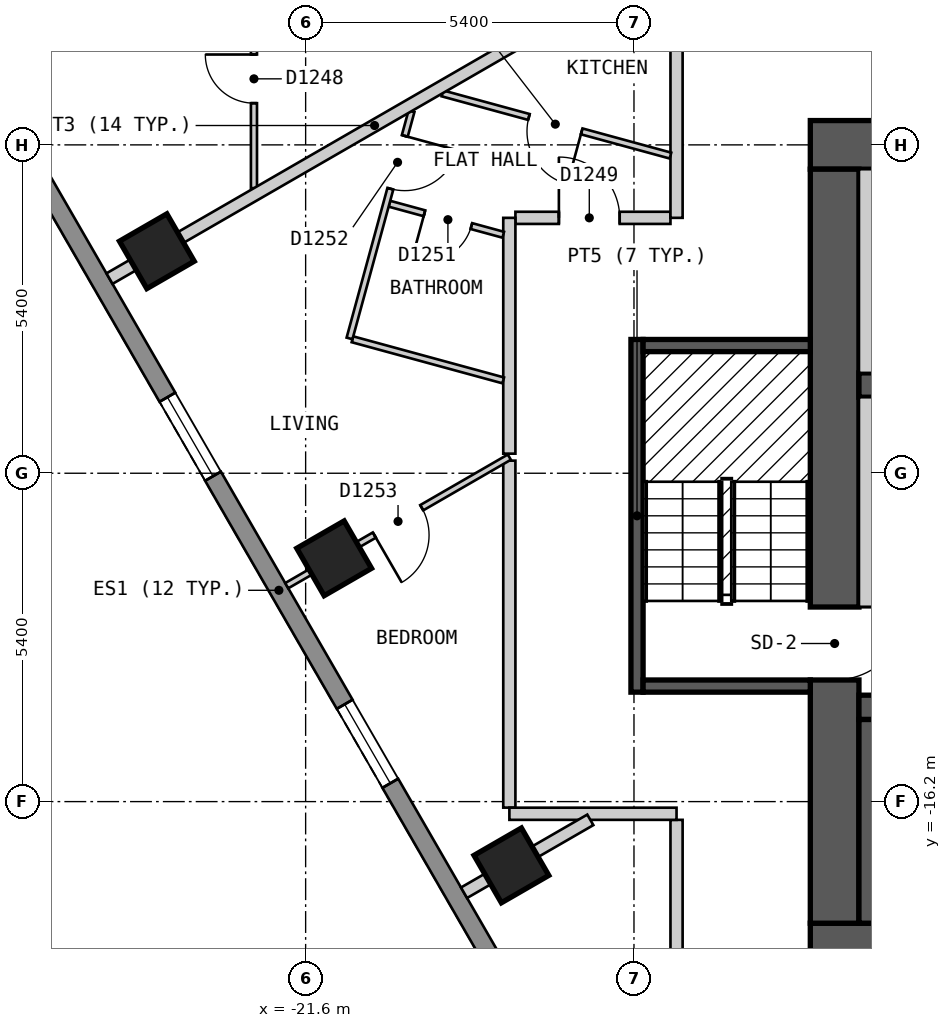
"""IFC4 building model, lengths in metres.
Left out: names, types, materials, properties, quantities, classifications, styles, units other than length and angle.
Written with IfcOpenShell. Run it as: python <this file> out.ifc"""

import sys

from ifc_helpers import new_model, si_unit, direction, frame, frame_2d, origin, origin_2d, place, context, subcontext, project, spatial, polyline, rectangle, outline, extrude, element, fill, save


model = new_model("IFC4")
c1 = context("Model", 3, precision=1e-05, world=origin(), true_north=direction((0.0, 1.0)))
c2 = subcontext(c1, "Body", "Model", "MODEL_VIEW")
j1 = project(units=[si_unit("LENGTHUNIT", "METRE"), si_unit("PLANEANGLEUNIT", "RADIAN")], contexts=[c1])
p1 = place(None, origin())
s1 = spatial("IfcSite", under=j1, at=p1, CompositionType="ELEMENT")
p2 = place(p1, origin())
s2 = spatial("IfcBuilding", under=s1, at=p2, CompositionType="ELEMENT")
p3 = place(p2, frame((0.0, 0.0, 117.6)))
s3 = spatial("IfcBuildingStorey", under=s2, at=p3, CompositionType="ELEMENT", Elevation=117.6)
for number, where, z_axis, x_axis in (
    (1, (-24.047, -7.149, 0.0), (0.0, 0.0, 1.0), (0.5, -0.866, 0.0)),
    (2, (-21.131, -12.199, 0.0), (0.0, 0.0, 1.0), (0.5, -0.866, 0.0)),
    (3, (-18.216, -17.249, 0.0), (0.0, 0.0, 1.0), (0.5, -0.866, 0.0)),
):
    element("IfcColumn", number, at=place(p3, frame(where, z_axis=z_axis, x_axis=x_axis)), inside=s3, PredefinedType="COLUMN", context=c2, shape_type="SweptSolid", body=[
        extrude(rectangle(XDim=0.9, YDim=0.9, at=origin_2d()), origin(), (0.0, 0.0, 1.0), 3.0),
    ])
p4 = place(p3, frame((-13.3, -18.6, 0.0), z_axis=(0.0, 0.0, 1.0), x_axis=(1.0, 0.0, 0.0)))
e4 = element("IfcWall", 4, at=p4, inside=s3, PredefinedType="SHEAR", context=c2, shape_type="SweptSolid", body=[
    extrude(rectangle(XDim=26.6, YDim=0.8, at=frame_2d((13.3, 0.0))), origin(), (0.0, 0.0, 1.0), 2.7),
])
p5 = place(p3, frame((-13.3, -5.4, 0.0), z_axis=(0.0, 0.0, 1.0), x_axis=(1.0, 0.0, 0.0)))
e5 = element("IfcWall", 5, at=p5, inside=s3, PredefinedType="SHEAR", context=c2, shape_type="SweptSolid", body=[
    extrude(rectangle(XDim=26.6, YDim=0.8, at=frame_2d((13.3, 0.0))), origin(), (0.0, 0.0, 1.0), 2.7),
])
p6 = place(p5, frame((23.65, 0.0, 0.0)))
e6 = element("IfcOpeningElement", 6, at=p6, cuts=e5, PredefinedType="OPENING", context=c2, shape_type="SweptSolid", body=[
    extrude(rectangle(XDim=1.2, YDim=2.1, at=frame_2d((0.6, 1.05))), frame((0.0, 0.41, 0.0), z_axis=(0.0, -1.0, 0.0), x_axis=(1.0, 0.0, 0.0)), (0.0, 0.0, 1.0), 0.82),
])
p7 = place(p3, frame((-12.9, -18.2, 0.0), z_axis=(0.0, 0.0, 1.0), x_axis=(0.0, 1.0, 0.0)))
e7 = element("IfcWall", 7, at=p7, inside=s3, PredefinedType="SHEAR", context=c2, shape_type="SweptSolid", body=[
    extrude(rectangle(XDim=12.4, YDim=0.8, at=frame_2d((6.2, 0.0))), origin(), (0.0, 0.0, 1.0), 2.7),
])
p8 = place(p7, frame((4.0, 0.0, 0.0)))
e8 = element("IfcOpeningElement", 8, at=p8, cuts=e7, PredefinedType="OPENING", context=c2, shape_type="SweptSolid", body=[
    extrude(rectangle(XDim=1.2, YDim=2.1, at=frame_2d((0.6, 1.05))), frame((0.0, 0.41, 0.0), z_axis=(0.0, -1.0, 0.0), x_axis=(1.0, 0.0, 0.0)), (0.0, 0.0, 1.0), 0.82),
])
p9 = place(p3, frame((-12.5, -14.65, 0.0), z_axis=(0.0, 0.0, 1.0), x_axis=(1.0, 0.0, 0.0)))
e9 = element("IfcWall", 9, at=p9, inside=s3, PredefinedType="SHEAR", context=c2, shape_type="SweptSolid", body=[
    extrude(rectangle(XDim=25.0, YDim=0.4, at=frame_2d((12.5, 0.0))), origin(), (0.0, 0.0, 1.0), 2.7),
])
p10 = place(p9, frame((1.7, 0.0, 0.0), z_axis=(0.0, 0.0, 1.0), x_axis=(-1.0, 0.0, 0.0)))
e10 = element("IfcOpeningElement", 10, at=p10, cuts=e9, PredefinedType="OPENING", context=c2, shape_type="SweptSolid", body=[
    extrude(rectangle(XDim=1.2, YDim=2.1, at=frame_2d((0.6, 1.05))), frame((0.0, 0.21, 0.0), z_axis=(0.0, -1.0, 0.0), x_axis=(1.0, 0.0, 0.0)), (0.0, 0.0, 1.0), 0.42),
])
p11 = place(p9, frame((24.55, 0.0, 0.0), z_axis=(0.0, 0.0, 1.0), x_axis=(-1.0, 0.0, 0.0)))
e11 = element("IfcOpeningElement", 11, at=p11, cuts=e9, PredefinedType="OPENING", context=c2, shape_type="SweptSolid", body=[
    extrude(rectangle(XDim=1.2, YDim=2.1, at=frame_2d((0.6, 1.05))), frame((0.0, 0.21, 0.0), z_axis=(0.0, -1.0, 0.0), x_axis=(1.0, 0.0, 0.0)), (0.0, 0.0, 1.0), 0.42),
])
p12 = place(p9, frame((9.65, 0.0, 0.0), z_axis=(0.0, 0.0, 1.0), x_axis=(-1.0, 0.0, 0.0)))
e12 = element("IfcOpeningElement", 12, at=p12, cuts=e9, PredefinedType="OPENING", context=c2, shape_type="SweptSolid", body=[
    extrude(rectangle(XDim=1.0, YDim=2.1, at=frame_2d((0.5, 1.05))), frame((0.0, 0.21, 0.0), z_axis=(0.0, -1.0, 0.0), x_axis=(1.0, 0.0, 0.0)), (0.0, 0.0, 1.0), 0.42),
])
p13 = place(p9, frame((16.05, 0.0, 0.0), z_axis=(0.0, 0.0, 1.0), x_axis=(-1.0, 0.0, 0.0)))
e13 = element("IfcOpeningElement", 13, at=p13, cuts=e9, PredefinedType="OPENING", context=c2, shape_type="SweptSolid", body=[
    extrude(rectangle(XDim=1.0, YDim=2.1, at=frame_2d((0.5, 1.05))), frame((0.0, 0.21, 0.0), z_axis=(0.0, -1.0, 0.0), x_axis=(1.0, 0.0, 0.0)), (0.0, 0.0, 1.0), 0.42),
])
p14 = place(p3, frame((-12.5, -9.35, 0.0), z_axis=(0.0, 0.0, 1.0), x_axis=(1.0, 0.0, 0.0)))
e14 = element("IfcWall", 14, at=p14, inside=s3, PredefinedType="SHEAR", context=c2, shape_type="SweptSolid", body=[
    extrude(rectangle(XDim=22.7, YDim=0.4, at=frame_2d((11.35, 0.0))), origin(), (0.0, 0.0, 1.0), 2.7),
])
p15 = place(p14, frame((1.1, 0.0, 0.0)))
e15 = element("IfcOpeningElement", 15, at=p15, cuts=e14, PredefinedType="OPENING", context=c2, shape_type="SweptSolid", body=[
    extrude(rectangle(XDim=1.1, YDim=2.1, at=frame_2d((0.55, 1.05))), frame((0.0, 0.21, 0.0), z_axis=(0.0, -1.0, 0.0), x_axis=(1.0, 0.0, 0.0)), (0.0, 0.0, 1.0), 0.42),
])
p16 = place(p14, frame((3.9, 0.0, 0.0)))
e16 = element("IfcOpeningElement", 16, at=p16, cuts=e14, PredefinedType="OPENING", context=c2, shape_type="SweptSolid", body=[
    extrude(rectangle(XDim=1.1, YDim=2.1, at=frame_2d((0.55, 1.05))), frame((0.0, 0.21, 0.0), z_axis=(0.0, -1.0, 0.0), x_axis=(1.0, 0.0, 0.0)), (0.0, 0.0, 1.0), 0.42),
])
p17 = place(p14, frame((6.7, 0.0, 0.0)))
e17 = element("IfcOpeningElement", 17, at=p17, cuts=e14, PredefinedType="OPENING", context=c2, shape_type="SweptSolid", body=[
    extrude(rectangle(XDim=1.1, YDim=2.1, at=frame_2d((0.55, 1.05))), frame((0.0, 0.21, 0.0), z_axis=(0.0, -1.0, 0.0), x_axis=(1.0, 0.0, 0.0)), (0.0, 0.0, 1.0), 0.42),
])
p18 = place(p14, frame((9.0, 0.0, 0.0)))
e18 = element("IfcOpeningElement", 18, at=p18, cuts=e14, PredefinedType="OPENING", context=c2, shape_type="SweptSolid", body=[
    extrude(rectangle(XDim=1.1, YDim=2.1, at=frame_2d((0.55, 1.05))), frame((0.0, 0.21, 0.0), z_axis=(0.0, -1.0, 0.0), x_axis=(1.0, 0.0, 0.0)), (0.0, 0.0, 1.0), 0.42),
])
p19 = place(p14, frame((11.3, 0.0, 0.0)))
e19 = element("IfcOpeningElement", 19, at=p19, cuts=e14, PredefinedType="OPENING", context=c2, shape_type="SweptSolid", body=[
    extrude(rectangle(XDim=1.1, YDim=2.1, at=frame_2d((0.55, 1.05))), frame((0.0, 0.21, 0.0), z_axis=(0.0, -1.0, 0.0), x_axis=(1.0, 0.0, 0.0)), (0.0, 0.0, 1.0), 0.42),
])
p20 = place(p14, frame((13.6, 0.0, 0.0)))
e20 = element("IfcOpeningElement", 20, at=p20, cuts=e14, PredefinedType="OPENING", context=c2, shape_type="SweptSolid", body=[
    extrude(rectangle(XDim=1.1, YDim=2.1, at=frame_2d((0.55, 1.05))), frame((0.0, 0.21, 0.0), z_axis=(0.0, -1.0, 0.0), x_axis=(1.0, 0.0, 0.0)), (0.0, 0.0, 1.0), 0.42),
])
p21 = place(p14, frame((15.9, 0.0, 0.0)))
e21 = element("IfcOpeningElement", 21, at=p21, cuts=e14, PredefinedType="OPENING", context=c2, shape_type="SweptSolid", body=[
    extrude(rectangle(XDim=1.1, YDim=2.1, at=frame_2d((0.55, 1.05))), frame((0.0, 0.21, 0.0), z_axis=(0.0, -1.0, 0.0), x_axis=(1.0, 0.0, 0.0)), (0.0, 0.0, 1.0), 0.42),
])
p22 = place(p14, frame((18.2, 0.0, 0.0)))
e22 = element("IfcOpeningElement", 22, at=p22, cuts=e14, PredefinedType="OPENING", context=c2, shape_type="SweptSolid", body=[
    extrude(rectangle(XDim=1.1, YDim=2.1, at=frame_2d((0.55, 1.05))), frame((0.0, 0.21, 0.0), z_axis=(0.0, -1.0, 0.0), x_axis=(1.0, 0.0, 0.0)), (0.0, 0.0, 1.0), 0.42),
])
p23 = place(p14, frame((20.6, 0.0, 0.0)))
e23 = element("IfcOpeningElement", 23, at=p23, cuts=e14, PredefinedType="OPENING", context=c2, shape_type="SweptSolid", body=[
    extrude(rectangle(XDim=1.1, YDim=2.1, at=frame_2d((0.55, 1.05))), frame((0.0, 0.21, 0.0), z_axis=(0.0, -1.0, 0.0), x_axis=(1.0, 0.0, 0.0)), (0.0, 0.0, 1.0), 0.42),
])
p24 = place(p3, frame((-28.218, -2.025, 0.0), z_axis=(0.0, 0.0, 1.0), x_axis=(0.500017503135, -0.866015298109, 0.0)))
e24 = element("IfcWall", 24, at=p24, inside=s3, PredefinedType="SOLIDWALL", context=c2, shape_type="SweptSolid", body=[
    extrude(outline(polyline([(0.0, -0.15), (24.711, -0.15), (24.631, 0.15), (0.08, 0.15), (0.0, -0.15)])), origin(), (0.0, 0.0, 1.0), 2.7),
])
p25 = place(p24, frame((2.857, 0.0, 0.15)))
e25 = element("IfcOpeningElement", 25, at=p25, cuts=e24, PredefinedType="OPENING", context=c2, shape_type="SweptSolid", body=[
    extrude(rectangle(XDim=1.5, YDim=2.1, at=frame_2d((0.75, 1.05))), frame((0.0, 0.16, 0.0), z_axis=(0.0, -1.0, 0.0), x_axis=(1.0, 0.0, 0.0)), (0.0, 0.0, 1.0), 0.32),
])
p26 = place(p24, frame((8.689, 0.0, 0.15)))
e26 = element("IfcOpeningElement", 26, at=p26, cuts=e24, PredefinedType="OPENING", context=c2, shape_type="SweptSolid", body=[
    extrude(rectangle(XDim=1.5, YDim=2.1, at=frame_2d((0.75, 1.05))), frame((0.0, 0.16, 0.0), z_axis=(0.0, -1.0, 0.0), x_axis=(1.0, 0.0, 0.0)), (0.0, 0.0, 1.0), 0.32),
])
p27 = place(p24, frame((14.52, 0.0, 0.15)))
e27 = element("IfcOpeningElement", 27, at=p27, cuts=e24, PredefinedType="OPENING", context=c2, shape_type="SweptSolid", body=[
    extrude(rectangle(XDim=1.5, YDim=2.1, at=frame_2d((0.75, 1.05))), frame((0.0, 0.16, 0.0), z_axis=(0.0, -1.0, 0.0), x_axis=(1.0, 0.0, 0.0)), (0.0, 0.0, 1.0), 0.32),
])
p28 = place(p24, frame((20.351, 0.0, 0.15)))
e28 = element("IfcOpeningElement", 28, at=p28, cuts=e24, PredefinedType="OPENING", context=c2, shape_type="SweptSolid", body=[
    extrude(rectangle(XDim=1.5, YDim=2.1, at=frame_2d((0.75, 1.05))), frame((0.0, 0.16, 0.0), z_axis=(0.0, -1.0, 0.0), x_axis=(1.0, 0.0, 0.0)), (0.0, 0.0, 1.0), 0.32),
])
p29 = place(p3, frame((-15.5, -16.5, 0.0), z_axis=(0.0, 0.0, 1.0), x_axis=(0.0, -1.0, 0.0)))
e29 = element("IfcWall", 29, at=p29, inside=s3, PredefinedType="PARTITIONING", context=c2, shape_type="SweptSolid", body=[
    extrude(rectangle(XDim=4.599, YDim=0.2, at=frame_2d((2.3, 0.0))), origin(), (0.0, 0.0, 1.0), 2.7),
])
p30 = place(p3, frame((-18.25, -10.593, 0.0), z_axis=(0.0, 0.0, 1.0), x_axis=(0.0, -1.0, 0.0)))
e30 = element("IfcWall", 30, at=p30, inside=s3, PredefinedType="PARTITIONING", context=c2, shape_type="SweptSolid", body=[
    extrude(rectangle(XDim=5.706, YDim=0.2, at=frame_2d((2.853, 0.0))), origin(), (0.0, 0.0, 1.0), 2.7),
])
p31 = place(p3, frame((-18.15, -6.6, 0.0), z_axis=(0.0, 0.0, 1.0), x_axis=(1.0, 0.0, 0.0)))
e31 = element("IfcWall", 31, at=p31, inside=s3, PredefinedType="PARTITIONING", context=c2, shape_type="SweptSolid", body=[
    extrude(rectangle(XDim=2.55, YDim=0.2, at=frame_2d((1.275, 0.0))), origin(), (0.0, 0.0, 1.0), 2.7),
])
p32 = place(p31, frame((0.715, 0.0, 0.0)))
e32 = element("IfcOpeningElement", 32, at=p32, cuts=e31, PredefinedType="OPENING", context=c2, shape_type="SweptSolid", body=[
    extrude(rectangle(XDim=1.0, YDim=2.1, at=frame_2d((0.5, 1.05))), frame((0.0, 0.11, 0.0), z_axis=(0.0, -1.0, 0.0), x_axis=(1.0, 0.0, 0.0)), (0.0, 0.0, 1.0), 0.22),
])
p33 = place(p3, frame((-18.249, -16.4, 0.0), z_axis=(0.0, 0.0, 1.0), x_axis=(1.0, 0.0, 0.0)))
e33 = element("IfcWall", 33, at=p33, inside=s3, PredefinedType="PARTITIONING", context=c2, shape_type="SweptSolid", body=[
    extrude(rectangle(XDim=2.749, YDim=0.2, at=frame_2d((1.375, 0.0))), origin(), (0.0, 0.0, 1.0), 2.7),
])
p34 = place(p3, frame((-15.5, -6.6, 0.0), z_axis=(0.0, 0.0, 1.0), x_axis=(0.0, 1.0, 0.0)))
e34 = element("IfcWall", 34, at=p34, inside=s3, PredefinedType="PARTITIONING", context=c2, shape_type="SweptSolid", body=[
    extrude(rectangle(XDim=3.047, YDim=0.2, at=frame_2d((1.523, 0.0))), origin(), (0.0, 0.0, 1.0), 2.7),
])
p35 = place(p3, frame((-18.25, -10.478, 0.0), z_axis=(0.0, 0.0, 1.0), x_axis=(0.0, 1.0, 0.0)))
e35 = element("IfcWall", 35, at=p35, inside=s3, PredefinedType="PARTITIONING", context=c2, shape_type="SweptSolid", body=[
    extrude(rectangle(XDim=3.878, YDim=0.2, at=frame_2d((1.939, 0.0))), origin(), (0.0, 0.0, 1.0), 2.7),
])
p36 = place(p3, frame((-19.351, -4.553, 0.0), z_axis=(0.0, 0.0, 1.0), x_axis=(0.964766719363, -0.263106779102, 0.0)))
e36 = element("IfcWall", 36, at=p36, inside=s3, PredefinedType="PARTITIONING", context=c2, shape_type="SweptSolid", body=[
    extrude(rectangle(XDim=3.888, YDim=0.1, at=frame_2d((1.944, 0.0))), origin(), (0.0, 0.0, 1.0), 2.7),
])
p37 = place(p36, frame((1.475, 0.0, 0.0)))
e37 = element("IfcOpeningElement", 37, at=p37, cuts=e36, PredefinedType="OPENING", context=c2, shape_type="SweptSolid", body=[
    extrude(rectangle(XDim=0.9, YDim=2.1, at=frame_2d((0.45, 1.05))), frame((0.0, 0.06, 0.0), z_axis=(0.0, -1.0, 0.0), x_axis=(1.0, 0.0, 0.0)), (0.0, 0.0, 1.0), 0.12),
])
p38 = place(p3, frame((-20.222, -6.368, 0.0), z_axis=(0.0, 0.0, 1.0), x_axis=(0.964827681618, -0.262883139024, 0.0)))
e38 = element("IfcWall", 38, at=p38, inside=s3, PredefinedType="PARTITIONING", context=c2, shape_type="SweptSolid", body=[
    extrude(rectangle(XDim=1.94, YDim=0.1, at=frame_2d((0.97, 0.0))), origin(), (0.0, 0.0, 1.0), 2.7),
])
p39 = place(p38, frame((0.597, 0.0, 0.0)))
e39 = element("IfcOpeningElement", 39, at=p39, cuts=e38, PredefinedType="OPENING", context=c2, shape_type="SweptSolid", body=[
    extrude(rectangle(XDim=0.8, YDim=2.1, at=frame_2d((0.4, 1.05))), frame((0.0, 0.06, 0.0), z_axis=(0.0, -1.0, 0.0), x_axis=(1.0, 0.0, 0.0)), (0.0, 0.0, 1.0), 0.12),
])
p40 = place(p3, frame((-20.83, -8.597, 0.0), z_axis=(0.0, 0.0, 1.0), x_axis=(0.964796691053, -0.262996853468, 0.0)))
e40 = element("IfcWall", 40, at=p40, inside=s3, PredefinedType="PARTITIONING", context=c2, shape_type="SweptSolid", body=[
    extrude(rectangle(XDim=2.571, YDim=0.1, at=frame_2d((1.285, 0.0))), origin(), (0.0, 0.0, 1.0), 2.7),
])
p41 = place(p3, frame((-20.878, -8.583, 0.0), z_axis=(0.0, 0.0, 1.0), x_axis=(0.263144077993, 0.964756546605, 0.0)))
e41 = element("IfcWall", 41, at=p41, inside=s3, PredefinedType="PARTITIONING", context=c2, shape_type="SweptSolid", body=[
    extrude(rectangle(XDim=3.873, YDim=0.1, at=frame_2d((1.936, 0.0))), origin(), (0.0, 0.0, 1.0), 2.7),
])
p42 = place(p41, frame((2.552, 0.0, 0.0)))
e42 = element("IfcOpeningElement", 42, at=p42, cuts=e41, PredefinedType="OPENING", context=c2, shape_type="SweptSolid", body=[
    extrude(rectangle(XDim=0.9, YDim=2.1, at=frame_2d((0.45, 1.05))), frame((0.0, 0.06, 0.0), z_axis=(0.0, -1.0, 0.0), x_axis=(1.0, 0.0, 0.0)), (0.0, 0.0, 1.0), 0.12),
])
p43 = place(p3, frame((-22.45, -6.112, 0.0), z_axis=(0.0, 0.0, 1.0), x_axis=(0.0, 1.0, 0.0)))
e43 = element("IfcWall", 43, at=p43, inside=s3, PredefinedType="PARTITIONING", context=c2, shape_type="SweptSolid", body=[
    extrude(rectangle(XDim=3.712, YDim=0.1, at=frame_2d((1.856, 0.0))), origin(), (0.0, 0.0, 1.0), 2.7),
])
p44 = place(p43, frame((1.398, 0.0, 0.0)))
e44 = element("IfcOpeningElement", 44, at=p44, cuts=e43, PredefinedType="OPENING", context=c2, shape_type="SweptSolid", body=[
    extrude(rectangle(XDim=0.8, YDim=2.1, at=frame_2d((0.4, 1.05))), frame((0.0, 0.06, 0.0), z_axis=(0.0, -1.0, 0.0), x_axis=(1.0, 0.0, 0.0)), (0.0, 0.0, 1.0), 0.12),
])
p45 = place(p3, frame((-21.911, -12.649, 0.0), z_axis=(0.0, 0.0, 1.0), x_axis=(0.865984571374, 0.500070717141, 0.0)))
e45 = element("IfcWall", 45, at=p45, inside=s3, PredefinedType="PARTITIONING", context=c2, shape_type="SweptSolid", body=[
    extrude(rectangle(XDim=4.228, YDim=0.1, at=frame_2d((2.114, 0.0))), origin(), (0.0, 0.0, 1.0), 2.7),
])
p46 = place(p45, frame((1.664, 0.0, 0.0)))
e46 = element("IfcOpeningElement", 46, at=p46, cuts=e45, PredefinedType="OPENING", context=c2, shape_type="SweptSolid", body=[
    extrude(rectangle(XDim=0.9, YDim=2.1, at=frame_2d((0.45, 1.05))), frame((0.0, 0.06, 0.0), z_axis=(0.0, -1.0, 0.0), x_axis=(1.0, 0.0, 0.0)), (0.0, 0.0, 1.0), 0.12),
])
p47 = place(p3, frame((-18.995, -17.699, 0.0), z_axis=(0.0, 0.0, 1.0), x_axis=(0.86607371389, 0.499916315105, 0.0)))
e47 = element("IfcWall", 47, at=p47, inside=s3, PredefinedType="PARTITIONING", context=c2, shape_type="SweptSolid", body=[
    extrude(rectangle(XDim=2.398, YDim=0.2, at=frame_2d((1.199, 0.0))), origin(), (0.0, 0.0, 1.0), 2.7),
])
p48 = place(p3, frame((-24.826, -7.599, 0.0), z_axis=(0.0, 0.0, 1.0), x_axis=(0.86599621094, 0.500050560081, 0.0)))
e48 = element("IfcWall", 48, at=p48, inside=s3, PredefinedType="PARTITIONING", context=c2, shape_type="SweptSolid", body=[
    extrude(rectangle(XDim=10.069, YDim=0.2, at=frame_2d((5.035, 0.0))), origin(), (0.0, 0.0, 1.0), 2.7),
])
p49 = place(p3, frame((-16.15, -14.4, 0.0), z_axis=(0.0, 0.0, 1.0), x_axis=(0.0, 1.0, 0.0)))
e49 = element("IfcWall", 49, at=p49, inside=s3, PredefinedType="SOLIDWALL", context=c2, shape_type="SweptSolid", body=[
    extrude(rectangle(XDim=5.8, YDim=0.2, at=frame_2d((2.9, 0.0))), origin(), (0.0, 0.0, 1.0), 2.7),
])
for number, where, z_axis, x_axis in (
    (50, (-16.05, -14.3, 0.0), (0.0, 0.0, 1.0), (1.0, 0.0, 0.0)),
    (51, (-16.05, -8.7, 0.0), (0.0, 0.0, 1.0), (1.0, 0.0, 0.0)),
):
    element("IfcWall", number, at=place(p3, frame(where, z_axis=z_axis, x_axis=x_axis)), inside=s3, PredefinedType="SOLIDWALL", context=c2, shape_type="SweptSolid", body=[
        extrude(rectangle(XDim=2.75, YDim=0.2, at=frame_2d((1.375, 0.0))), origin(), (0.0, 0.0, 1.0), 2.7),
    ])
p50 = place(p3, frame((-12.3, -18.2, 0.0), z_axis=(0.0, 0.0, 1.0), x_axis=(0.0, 1.0, 0.0)))
e52 = element("IfcWall", 52, at=p50, inside=s3, PredefinedType="SOLIDWALL", context=c2, shape_type="SweptSolid", body=[
    extrude(rectangle(XDim=3.35, YDim=0.4, at=frame_2d((1.675, 0.0))), origin(), (0.0, 0.0, 1.0), 2.7),
])
p51 = place(p3, frame((-12.3, -13.0, 0.0), z_axis=(0.0, 0.0, 1.0), x_axis=(0.0, 1.0, 0.0)))
e53 = element("IfcWall", 53, at=p51, inside=s3, PredefinedType="PARTITIONING", context=c2, shape_type="SweptSolid", body=[
    extrude(rectangle(XDim=3.45, YDim=0.4, at=frame_2d((1.725, 0.0))), origin(), (0.0, 0.0, 1.0), 2.7),
])
p52 = place(p3, frame((-12.3, -9.15, 0.0), z_axis=(0.0, 0.0, 1.0), x_axis=(0.0, 1.0, 0.0)))
e54 = element("IfcWall", 54, at=p52, inside=s3, PredefinedType="SOLIDWALL", context=c2, shape_type="SweptSolid", body=[
    extrude(rectangle(XDim=3.35, YDim=0.4, at=frame_2d((1.675, 0.0))), origin(), (0.0, 0.0, 1.0), 2.7),
])
p53 = place(p26, origin())
e55 = element("IfcWindow", 55, at=p53, inside=s3, PartitioningType="SINGLE_PANEL", PredefinedType="WINDOW", context=c2, shape_type="SweptSolid", body=[
    extrude(rectangle(XDim=1.5, YDim=2.1, at=frame_2d((0.75, 1.05))), frame((0.0, 0.03, 0.0), z_axis=(0.0, -1.0, 0.0), x_axis=(1.0, 0.0, 0.0)), (0.0, 0.0, 1.0), 0.06),
])
fill(e26, e55)
p54 = place(p27, origin())
e56 = element("IfcWindow", 56, at=p54, inside=s3, PartitioningType="SINGLE_PANEL", PredefinedType="WINDOW", context=c2, shape_type="SweptSolid", body=[
    extrude(rectangle(XDim=1.5, YDim=2.1, at=frame_2d((0.75, 1.05))), frame((0.0, 0.03, 0.0), z_axis=(0.0, -1.0, 0.0), x_axis=(1.0, 0.0, 0.0)), (0.0, 0.0, 1.0), 0.06),
])
fill(e27, e56)
p55 = place(p44, origin())
e57 = element("IfcDoor", 57, at=p55, inside=s3, OperationType="SINGLE_SWING_RIGHT", PredefinedType="DOOR", context=c2, shape_type="SweptSolid", body=[
    extrude(rectangle(XDim=0.8, YDim=2.1, at=frame_2d((0.4, 1.05))), frame((0.0, 0.025, 0.0), z_axis=(0.0, -1.0, 0.0), x_axis=(1.0, 0.0, 0.0)), (0.0, 0.0, 1.0), 0.05),
])
fill(e44, e57)
p56 = place(p32, origin())
e58 = element("IfcDoor", 58, at=p56, inside=s3, OperationType="SINGLE_SWING_LEFT", PredefinedType="DOOR", context=c2, shape_type="SweptSolid", body=[
    extrude(rectangle(XDim=1.0, YDim=2.1, at=frame_2d((0.5, 1.05))), frame((0.0, 0.025, 0.0), z_axis=(0.0, -1.0, 0.0), x_axis=(1.0, 0.0, 0.0)), (0.0, 0.0, 1.0), 0.05),
])
fill(e32, e58)
p57 = place(p37, origin())
e59 = element("IfcDoor", 59, at=p57, inside=s3, OperationType="SINGLE_SWING_RIGHT", PredefinedType="DOOR", context=c2, shape_type="SweptSolid", body=[
    extrude(rectangle(XDim=0.9, YDim=2.1, at=frame_2d((0.45, 1.05))), frame((0.0, 0.025, 0.0), z_axis=(0.0, -1.0, 0.0), x_axis=(1.0, 0.0, 0.0)), (0.0, 0.0, 1.0), 0.05),
])
fill(e37, e59)
p58 = place(p39, origin())
e60 = element("IfcDoor", 60, at=p58, inside=s3, OperationType="SINGLE_SWING_LEFT", PredefinedType="DOOR", context=c2, shape_type="SweptSolid", body=[
    extrude(rectangle(XDim=0.8, YDim=2.1, at=frame_2d((0.4, 1.05))), frame((0.0, 0.025, 0.0), z_axis=(0.0, -1.0, 0.0), x_axis=(1.0, 0.0, 0.0)), (0.0, 0.0, 1.0), 0.05),
])
fill(e39, e60)
p59 = place(p42, origin())
e61 = element("IfcDoor", 61, at=p59, inside=s3, OperationType="SINGLE_SWING_RIGHT", PredefinedType="DOOR", context=c2, shape_type="SweptSolid", body=[
    extrude(rectangle(XDim=0.9, YDim=2.1, at=frame_2d((0.45, 1.05))), frame((0.0, 0.025, 0.0), z_axis=(0.0, -1.0, 0.0), x_axis=(1.0, 0.0, 0.0)), (0.0, 0.0, 1.0), 0.05),
])
fill(e42, e61)
p60 = place(p46, origin())
e62 = element("IfcDoor", 62, at=p60, inside=s3, OperationType="SINGLE_SWING_LEFT", PredefinedType="DOOR", context=c2, shape_type="SweptSolid", body=[
    extrude(rectangle(XDim=0.9, YDim=2.1, at=frame_2d((0.45, 1.05))), frame((0.0, 0.025, 0.0), z_axis=(0.0, -1.0, 0.0), x_axis=(1.0, 0.0, 0.0)), (0.0, 0.0, 1.0), 0.05),
])
fill(e46, e62)
p61 = place(p8, origin())
e63 = element("IfcDoor", 63, at=p61, inside=s3, OperationType="SINGLE_SWING_RIGHT", PredefinedType="DOOR", context=c2, shape_type="SweptSolid", body=[
    extrude(rectangle(XDim=1.2, YDim=2.1, at=frame_2d((0.6, 1.05))), frame((0.0, 0.025, 0.0), z_axis=(0.0, -1.0, 0.0), x_axis=(1.0, 0.0, 0.0)), (0.0, 0.0, 1.0), 0.05),
])
fill(e8, e63)
save(model, sys.argv[1])
